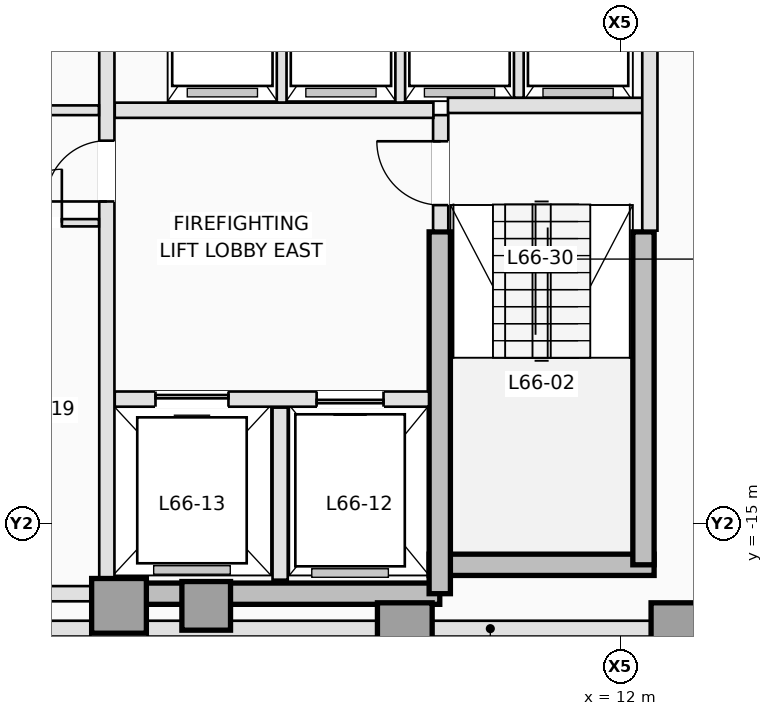
"""IFC4 building model, lengths in metres.
Left out: names, types, materials, properties, quantities, classifications, styles, units other than length and angle.
Written with IfcOpenShell. Run it as: python <this file> out.ifc"""

import sys

from ifc_helpers import new_model, si_unit, direction, frame, frame_2d, origin, origin_2d, place, context, subcontext, project, spatial, rectangle, extrude, element, fill, save


model = new_model("IFC4")
c1 = context("Model", 3, precision=1e-05, world=origin(), true_north=direction((0.0, 1.0)))
c2 = subcontext(c1, "Body", "Model", "MODEL_VIEW")
j1 = project(units=[si_unit("LENGTHUNIT", "METRE"), si_unit("PLANEANGLEUNIT", "RADIAN")], contexts=[c1])
p1 = place(None, origin())
s1 = spatial("IfcSite", under=j1, at=p1, CompositionType="ELEMENT")
p2 = place(p1, origin())
s2 = spatial("IfcBuilding", under=s1, at=p2, CompositionType="ELEMENT")
p3 = place(p2, frame((0.0, 0.0, 239.4)))
s3 = spatial("IfcBuildingStorey", under=s2, at=p3, CompositionType="ELEMENT", Elevation=239.4)
p4 = place(p3, frame((3.75, -16.15, 0.0), z_axis=(0.0, 0.0, 1.0), x_axis=(1.0, 0.0, 0.0)))
e1 = element("IfcWall", 1, at=p4, inside=s3, PredefinedType="SHEAR", context=c2, shape_type="SweptSolid", body=[
    extrude(rectangle(XDim=5.275, YDim=0.35, at=frame_2d((2.637, 0.0))), origin(), (0.0, 0.0, 1.0), 3.5),
])
p5 = place(p3, frame((8.85, -15.675, 0.0), z_axis=(0.0, 0.0, 1.0), x_axis=(1.0, 0.0, 0.0)))
e2 = element("IfcWall", 2, at=p5, inside=s3, PredefinedType="SHEAR", context=c2, shape_type="SweptSolid", body=[
    extrude(rectangle(XDim=3.7, YDim=0.35, at=frame_2d((1.85, 0.0))), origin(), (0.0, 0.0, 1.0), 3.5),
])
p6 = place(p3, frame((12.375, -15.675, 0.0), z_axis=(0.0, 0.0, 1.0), x_axis=(0.0, 1.0, 0.0)))
e3 = element("IfcWall", 3, at=p6, inside=s3, PredefinedType="SHEAR", context=c2, shape_type="SweptSolid", body=[
    extrude(rectangle(XDim=5.475, YDim=0.35, at=frame_2d((2.738, 0.0))), origin(), (0.0, 0.0, 1.0), 3.5),
])
p7 = place(p3, frame((9.025, -16.15, 0.0), z_axis=(0.0, 0.0, 1.0), x_axis=(0.0, 1.0, 0.0)))
e4 = element("IfcWall", 4, at=p7, inside=s3, PredefinedType="SHEAR", context=c2, shape_type="SweptSolid", body=[
    extrude(rectangle(XDim=5.95, YDim=0.35, at=frame_2d((2.975, 0.0))), origin(), (0.0, 0.0, 1.0), 3.5),
])
for number, where, z_axis, x_axis in (
    (5, (3.75, -16.35, 0.0), (0.0, 0.0, 1.0), (1.0, 0.0, 0.0)),
    (6, (8.45, -16.75, 0.0), (0.0, 0.0, 1.0), (1.0, 0.0, 0.0)),
    (7, (12.95, -16.75, 0.0), (0.0, 0.0, 1.0), (1.0, 0.0, 0.0)),
):
    element("IfcColumn", number, at=place(p3, frame(where, z_axis=z_axis, x_axis=x_axis)), inside=s3, PredefinedType="COLUMN", context=c2, shape_type="SweptSolid", body=[
        extrude(rectangle(XDim=0.9, YDim=0.9, at=origin_2d()), origin(), (0.0, 0.0, 1.0), 3.5),
    ])
p8 = place(p3, frame((5.184, -16.35, 0.0), z_axis=(0.0, 0.0, 1.0), x_axis=(0.0, 1.0, 0.0)))
e8 = element("IfcColumn", 8, at=p8, inside=s3, PredefinedType="COLUMN", context=c2, shape_type="SweptSolid", body=[
    extrude(rectangle(XDim=0.8, YDim=0.8, at=origin_2d()), origin(), (0.0, 0.0, 1.0), 3.5),
])
p9 = place(p3, frame((15.493, -16.725, 0.0), z_axis=(0.0, 0.0, 1.0), x_axis=(-1.0, 0.0, 0.0)))
e9 = element("IfcWall", 9, at=p9, inside=s3, PredefinedType="STANDARD", context=c2, shape_type="SweptSolid", body=[
    extrude(rectangle(XDim=11.273, YDim=0.26, at=frame_2d((5.636, 0.0))), origin(), (0.0, 0.0, 1.0), 2.79),
])
p10 = place(p3, frame((3.28, -16.725, 0.0), z_axis=(0.0, 0.0, 1.0), x_axis=(-1.0, 0.0, 0.0)))
e10 = element("IfcWall", 10, at=p10, inside=s3, PredefinedType="STANDARD", context=c2, shape_type="SweptSolid", body=[
    extrude(rectangle(XDim=2.674, YDim=0.26, at=frame_2d((1.337, 0.0))), origin(), (0.0, 0.0, 1.0), 3.25),
])
p11 = place(p3, frame((9.04, -10.18, 0.0), z_axis=(0.0, 0.0, 1.0), x_axis=(0.0, 1.0, 0.0)))
e11 = element("IfcWall", 11, at=p11, inside=s3, PredefinedType="PARTITIONING", context=c2, shape_type="SweptSolid", body=[
    extrude(rectangle(XDim=1.9, YDim=0.25, at=frame_2d((0.95, 0.0))), origin(), (0.0, 0.0, 1.0), 3.25),
])
p12 = place(p11, frame((0.42, 0.0, 0.0)))
e12 = element("IfcOpeningElement", 12, at=p12, cuts=e11, PredefinedType="OPENING", context=c2, shape_type="SweptSolid", body=[
    extrude(rectangle(XDim=1.05, YDim=2.15, at=frame_2d((0.525, 1.075))), frame((0.0, 0.135, 0.0), z_axis=(0.0, -1.0, 0.0), x_axis=(1.0, 0.0, 0.0)), (0.0, 0.0, 1.0), 0.27),
])
p13 = place(p3, frame((9.16, -8.12, 0.0), z_axis=(0.0, 0.0, 1.0), x_axis=(1.0, 0.0, 0.0)))
e13 = element("IfcWall", 13, at=p13, inside=s3, PredefinedType="PARTITIONING", context=c2, shape_type="SweptSolid", body=[
    extrude(rectangle(XDim=3.22, YDim=0.25, at=frame_2d((1.61, 0.0))), origin(), (0.0, 0.0, 1.0), 3.25),
])
p14 = place(p3, frame((12.48, -10.18, 0.0), z_axis=(0.0, 0.0, 1.0), x_axis=(0.0, 1.0, 0.0)))
e14 = element("IfcWall", 14, at=p14, inside=s3, PredefinedType="PARTITIONING", context=c2, shape_type="SweptSolid", body=[
    extrude(rectangle(XDim=4.84, YDim=0.25, at=frame_2d((2.42, 0.0))), origin(), (0.0, 0.0, 1.0), 3.25),
])
p15 = place(p3, frame((3.68, -12.95, 0.0), z_axis=(0.0, 0.0, 1.0), x_axis=(1.0, 0.0, 0.0)))
e15 = element("IfcWall", 15, at=p15, inside=s3, PredefinedType="PARTITIONING", context=c2, shape_type="SweptSolid", body=[
    extrude(rectangle(XDim=5.168, YDim=0.25, at=frame_2d((2.584, 0.0))), origin(), (0.0, 0.0, 1.0), 3.25),
])
p16 = place(p15, frame((3.32, 0.0, 0.0)))
e16 = element("IfcOpeningElement", 16, at=p16, cuts=e15, PredefinedType="OPENING", context=c2, shape_type="SweptSolid", body=[
    extrude(rectangle(XDim=1.1, YDim=2.15, at=frame_2d((0.55, 1.075))), frame((0.0, 0.135, 0.0), z_axis=(0.0, -1.0, 0.0), x_axis=(1.0, 0.0, 0.0)), (0.0, 0.0, 1.0), 0.27),
])
p17 = place(p15, frame((0.67, 0.0, 0.0)))
e17 = element("IfcOpeningElement", 17, at=p17, cuts=e15, PredefinedType="OPENING", context=c2, shape_type="SweptSolid", body=[
    extrude(rectangle(XDim=1.2, YDim=2.15, at=frame_2d((0.6, 1.075))), frame((0.0, 0.135, 0.0), z_axis=(0.0, -1.0, 0.0), x_axis=(1.0, 0.0, 0.0)), (0.0, 0.0, 1.0), 0.27),
])
p18 = place(p3, frame((6.4, -15.92, 0.0), z_axis=(0.0, 0.0, 1.0), x_axis=(0.0, 1.0, 0.0)))
e18 = element("IfcWall", 18, at=p18, inside=s3, PredefinedType="PARTITIONING", context=c2, shape_type="SweptSolid", body=[
    extrude(rectangle(XDim=2.83, YDim=0.25, at=frame_2d((1.415, 0.0))), origin(), (0.0, 0.0, 1.0), 3.25),
])
p19 = place(p3, frame((3.68, -8.2, 0.0), z_axis=(0.0, 0.0, 1.0), x_axis=(1.0, 0.0, 0.0)))
e19 = element("IfcWall", 19, at=p19, inside=s3, PredefinedType="PARTITIONING", context=c2, shape_type="SweptSolid", body=[
    extrude(rectangle(XDim=5.24, YDim=0.25, at=frame_2d((2.62, 0.0))), origin(), (0.0, 0.0, 1.0), 3.25),
])
p20 = place(p3, frame((3.55, -15.898, 0.0), z_axis=(0.0, 0.0, 1.0), x_axis=(0.0, 1.0, 0.0)))
e20 = element("IfcWall", 20, at=p20, inside=s3, PredefinedType="PARTITIONING", context=c2, shape_type="SweptSolid", body=[
    extrude(rectangle(XDim=10.558, YDim=0.25, at=frame_2d((5.279, 0.0))), origin(), (0.0, 0.0, 1.0), 3.25),
])
p21 = place(p20, frame((6.198, 0.0, 0.0)))
e21 = element("IfcOpeningElement", 21, at=p21, cuts=e20, PredefinedType="OPENING", context=c2, shape_type="SweptSolid", body=[
    extrude(rectangle(XDim=1.0, YDim=2.15, at=frame_2d((0.5, 1.075))), frame((0.0, 0.135, 0.0), z_axis=(0.0, -1.0, 0.0), x_axis=(1.0, 0.0, 0.0)), (0.0, 0.0, 1.0), 0.27),
])
for number, where, z_axis, x_axis in (
    (22, (6.425, -8.073, 0.0), (0.0, 0.0, 1.0), (0.0, 1.0, 0.0)),
    (23, (8.375, -8.073, 0.0), (0.0, 0.0, 1.0), (0.0, 1.0, 0.0)),
):
    element("IfcWall", number, at=place(p3, frame(where, z_axis=z_axis, x_axis=x_axis)), inside=s3, PredefinedType="PARTITIONING", context=c2, shape_type="SweptSolid", body=[
        extrude(rectangle(XDim=2.733, YDim=0.16, at=frame_2d((1.366, 0.0))), origin(), (0.0, 0.0, 1.0), 3.25),
    ])
p22 = place(p3, frame((10.325, -7.993, 0.0), z_axis=(0.0, 0.0, 1.0), x_axis=(0.0, 1.0, 0.0)))
e24 = element("IfcWall", 24, at=p22, inside=s3, PredefinedType="PARTITIONING", context=c2, shape_type="SweptSolid", body=[
    extrude(rectangle(XDim=2.653, YDim=0.16, at=frame_2d((1.326, 0.0))), origin(), (0.0, 0.0, 1.0), 3.25),
])
p23 = place(p3, frame((-3.298, -16.15, 0.0), z_axis=(0.0, 0.0, 1.0), x_axis=(1.0, 0.0, 0.0)))
e25 = element("IfcWall", 25, at=p23, inside=s3, PredefinedType="PARTITIONING", context=c2, shape_type="SweptSolid", body=[
    extrude(rectangle(XDim=6.596, YDim=0.25, at=frame_2d((3.298, 0.0))), origin(), (0.0, 0.0, 1.0), 2.844),
])
p24 = place(p3, frame((-3.42, -8.2, 0.0), z_axis=(0.0, 0.0, 1.0), x_axis=(1.0, 0.0, 0.0)))
e26 = element("IfcWall", 26, at=p24, inside=s3, PredefinedType="PARTITIONING", context=c2, shape_type="SweptSolid", body=[
    extrude(rectangle(XDim=6.84, YDim=0.16, at=frame_2d((3.42, 0.0))), origin(), (0.0, 0.0, 1.0), 3.25),
])
p25 = place(p24, frame((2.92, 0.0, 0.0)))
e27 = element("IfcOpeningElement", 27, at=p25, cuts=e26, PredefinedType="OPENING", context=c2, shape_type="SweptSolid", body=[
    extrude(rectangle(XDim=1.0, YDim=2.15, at=frame_2d((0.5, 1.075))), frame((0.0, 0.09, 0.0), z_axis=(0.0, -1.0, 0.0), x_axis=(1.0, 0.0, 0.0)), (0.0, 0.0, 1.0), 0.18),
])
p26 = place(p3, frame((-3.42, -10.05, 0.0), z_axis=(0.0, 0.0, 1.0), x_axis=(1.0, 0.0, 0.0)))
e28 = element("IfcWall", 28, at=p26, inside=s3, PredefinedType="PARTITIONING", context=c2, shape_type="SweptSolid", body=[
    extrude(rectangle(XDim=6.84, YDim=0.12, at=frame_2d((3.42, 0.0))), origin(), (0.0, 0.0, 1.0), 3.25),
])
p27 = place(p26, frame((1.85, 0.0, 0.0)))
e29 = element("IfcOpeningElement", 29, at=p27, cuts=e28, PredefinedType="OPENING", context=c2, shape_type="SweptSolid", body=[
    extrude(rectangle(XDim=0.92, YDim=2.12, at=frame_2d((0.46, 1.06))), frame((0.0, 0.07, 0.0), z_axis=(0.0, -1.0, 0.0), x_axis=(1.0, 0.0, 0.0)), (0.0, 0.0, 1.0), 0.14),
])
p28 = place(p26, frame((5.35, 0.0, 0.0)))
e30 = element("IfcOpeningElement", 30, at=p28, cuts=e28, PredefinedType="OPENING", context=c2, shape_type="SweptSolid", body=[
    extrude(rectangle(XDim=0.88, YDim=2.12, at=frame_2d((0.44, 1.06))), frame((0.0, 0.07, 0.0), z_axis=(0.0, -1.0, 0.0), x_axis=(1.0, 0.0, 0.0)), (0.0, 0.0, 1.0), 0.14),
])
p29 = place(p16, origin())
e31 = element("IfcDoor", 31, at=p29, inside=s3, OperationType="SLIDING_TO_RIGHT", PredefinedType="DOOR", context=c2, shape_type="SweptSolid", body=[
    extrude(rectangle(XDim=1.1, YDim=2.15, at=frame_2d((0.55, 1.075))), frame((0.0, 0.025, 0.0), z_axis=(0.0, -1.0, 0.0), x_axis=(1.0, 0.0, 0.0)), (0.0, 0.0, 1.0), 0.05),
])
fill(e16, e31)
p30 = place(p17, origin())
e32 = element("IfcDoor", 32, at=p30, inside=s3, OperationType="SLIDING_TO_LEFT", PredefinedType="DOOR", context=c2, shape_type="SweptSolid", body=[
    extrude(rectangle(XDim=1.2, YDim=2.15, at=frame_2d((0.6, 1.075))), frame((0.0, 0.025, 0.0), z_axis=(0.0, -1.0, 0.0), x_axis=(1.0, 0.0, 0.0)), (0.0, 0.0, 1.0), 0.05),
])
fill(e17, e32)
p31 = place(p12, origin())
e33 = element("IfcDoor", 33, at=p31, inside=s3, OperationType="SINGLE_SWING_RIGHT", PredefinedType="DOOR", context=c2, shape_type="SweptSolid", body=[
    extrude(rectangle(XDim=1.05, YDim=2.15, at=frame_2d((0.525, 1.075))), frame((0.0, 0.025, 0.0), z_axis=(0.0, -1.0, 0.0), x_axis=(1.0, 0.0, 0.0)), (0.0, 0.0, 1.0), 0.05),
])
fill(e12, e33)
p32 = place(p21, origin())
e34 = element("IfcDoor", 34, at=p32, inside=s3, OperationType="SINGLE_SWING_LEFT", PredefinedType="DOOR", context=c2, shape_type="SweptSolid", body=[
    extrude(rectangle(XDim=1.0, YDim=2.15, at=frame_2d((0.5, 1.075))), frame((0.0, 0.025, 0.0), z_axis=(0.0, -1.0, 0.0), x_axis=(1.0, 0.0, 0.0)), (0.0, 0.0, 1.0), 0.05),
])
fill(e21, e34)
p33 = place(p28, origin())
e35 = element("IfcDoor", 35, at=p33, inside=s3, OperationType="SINGLE_SWING_RIGHT", PredefinedType="DOOR", context=c2, shape_type="SweptSolid", body=[
    extrude(rectangle(XDim=0.88, YDim=2.12, at=frame_2d((0.44, 1.06))), frame((0.0, 0.025, 0.0), z_axis=(0.0, -1.0, 0.0), x_axis=(1.0, 0.0, 0.0)), (0.0, 0.0, 1.0), 0.05),
])
fill(e30, e35)
save(model, sys.argv[1])
